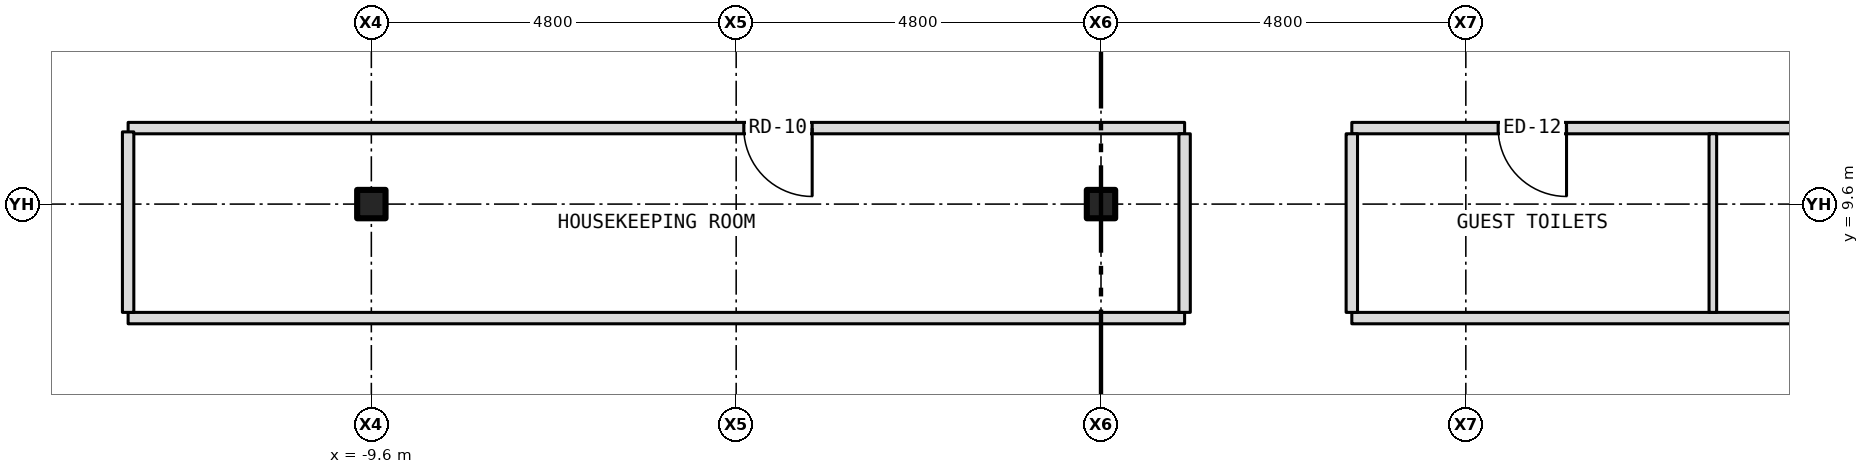
"""IFC4 building model, lengths in metres.
Left out: names, types, materials, properties, quantities, classifications, styles, units other than length and angle.
Written with IfcOpenShell. Run it as: python <this file> out.ifc"""

import sys

from ifc_helpers import new_model, si_unit, direction, frame, frame_2d, origin, origin_2d, place, context, subcontext, project, spatial, rectangle, i_section, extrude, element, fill, save


model = new_model("IFC4")
c1 = context("Model", 3, precision=1e-05, world=origin(), true_north=direction((0.0, 1.0)))
c2 = subcontext(c1, "Body", "Model", "MODEL_VIEW")
j1 = project(units=[si_unit("LENGTHUNIT", "METRE"), si_unit("PLANEANGLEUNIT", "RADIAN")], contexts=[c1])
p1 = place(None, origin())
s1 = spatial("IfcSite", under=j1, at=p1, CompositionType="ELEMENT")
p2 = place(p1, origin())
s2 = spatial("IfcBuilding", under=s1, at=p2, CompositionType="ELEMENT")
p3 = place(p2, frame((0.0, 0.0, 208.5)))
s3 = spatial("IfcBuildingStorey", under=s2, at=p3, CompositionType="ELEMENT", Elevation=208.5)
for number, where, z_axis, x_axis in (
    (1, (-9.6, 9.6, -0.15), (0.0, 0.0, 1.0), (1.0, 0.0, 0.0)),
    (2, (0.0, 9.6, -0.15), (0.0, 0.0, 1.0), (1.0, 0.0, 0.0)),
):
    element("IfcColumn", number, at=place(p3, frame(where, z_axis=z_axis, x_axis=x_axis)), inside=s3, PredefinedType="COLUMN", context=c2, shape_type="SweptSolid", body=[
        extrude(i_section(OverallWidth=0.373, OverallDepth=0.373, WebThickness=0.016, FlangeThickness=0.026, at=origin_2d()), origin(), (0.0, 0.0, 1.0), 3.5),
    ])
p4 = place(p3, frame((-12.8, 8.1, 0.0), z_axis=(0.0, 0.0, 1.0), x_axis=(1.0, 0.0, 0.0)))
e3 = element("IfcWall", 3, at=p4, inside=s3, PredefinedType="PARTITIONING", context=c2, shape_type="SweptSolid", body=[
    extrude(rectangle(XDim=13.9, YDim=0.15, at=frame_2d((6.95, 0.0))), origin(), (0.0, 0.0, 1.0), 3.35),
])
p5 = place(p3, frame((3.3, 8.1, 0.0), z_axis=(0.0, 0.0, 1.0), x_axis=(1.0, 0.0, 0.0)))
e4 = element("IfcWall", 4, at=p5, inside=s3, PredefinedType="PARTITIONING", context=c2, shape_type="SweptSolid", body=[
    extrude(rectangle(XDim=9.5, YDim=0.15, at=frame_2d((4.75, 0.0))), origin(), (0.0, 0.0, 1.0), 3.35),
])
p6 = place(p5, frame((6.675, 0.0, 0.0)))
e5 = element("IfcOpeningElement", 5, at=p6, cuts=e4, PredefinedType="OPENING", context=c2, shape_type="SweptSolid", body=[
    extrude(rectangle(XDim=0.9, YDim=2.1, at=frame_2d((0.45, 1.05))), frame((0.0, 0.087, 0.0), z_axis=(0.0, -1.0, 0.0), x_axis=(1.0, 0.0, 0.0)), (0.0, 0.0, 1.0), 0.174),
])
p7 = place(p3, frame((-12.8, 10.6, 0.0), z_axis=(0.0, 0.0, 1.0), x_axis=(1.0, 0.0, 0.0)))
e6 = element("IfcWall", 6, at=p7, inside=s3, PredefinedType="PARTITIONING", context=c2, shape_type="SweptSolid", body=[
    extrude(rectangle(XDim=13.9, YDim=0.15, at=frame_2d((6.95, 0.0))), origin(), (0.0, 0.0, 1.0), 3.35),
])
p8 = place(p7, frame((8.1, 0.0, 0.0)))
e7 = element("IfcOpeningElement", 7, at=p8, cuts=e6, PredefinedType="OPENING", context=c2, shape_type="SweptSolid", body=[
    extrude(rectangle(XDim=0.9, YDim=2.1, at=frame_2d((0.45, 1.05))), frame((0.0, 0.087, 0.0), z_axis=(0.0, -1.0, 0.0), x_axis=(1.0, 0.0, 0.0)), (0.0, 0.0, 1.0), 0.174),
])
p9 = place(p3, frame((3.3, 10.6, 0.0), z_axis=(0.0, 0.0, 1.0), x_axis=(1.0, 0.0, 0.0)))
e8 = element("IfcWall", 8, at=p9, inside=s3, PredefinedType="PARTITIONING", context=c2, shape_type="SweptSolid", body=[
    extrude(rectangle(XDim=9.5, YDim=0.15, at=frame_2d((4.75, 0.0))), origin(), (0.0, 0.0, 1.0), 3.35),
])
p10 = place(p9, frame((1.925, 0.0, 0.0)))
e9 = element("IfcOpeningElement", 9, at=p10, cuts=e8, PredefinedType="OPENING", context=c2, shape_type="SweptSolid", body=[
    extrude(rectangle(XDim=0.9, YDim=2.1, at=frame_2d((0.45, 1.05))), frame((0.0, 0.087, 0.0), z_axis=(0.0, -1.0, 0.0), x_axis=(1.0, 0.0, 0.0)), (0.0, 0.0, 1.0), 0.174),
])
p11 = place(p3, frame((-12.8, 8.175, 0.0), z_axis=(0.0, 0.0, 1.0), x_axis=(0.0, 1.0, 0.0)))
e10 = element("IfcWall", 10, at=p11, inside=s3, PredefinedType="PARTITIONING", context=c2, shape_type="SweptSolid", body=[
    extrude(rectangle(XDim=2.375, YDim=0.15, at=frame_2d((1.188, 0.0))), origin(), (0.0, 0.0, 1.0), 3.35),
])
for number, where, z_axis, x_axis in (
    (11, (1.1, 8.175, 0.0), (0.0, 0.0, 1.0), (0.0, 1.0, 0.0)),
    (12, (3.3, 8.175, 0.0), (0.0, 0.0, 1.0), (0.0, 1.0, 0.0)),
):
    element("IfcWall", number, at=place(p3, frame(where, z_axis=z_axis, x_axis=x_axis)), inside=s3, PredefinedType="PARTITIONING", context=c2, shape_type="SweptSolid", body=[
        extrude(rectangle(XDim=2.35, YDim=0.15, at=frame_2d((1.175, 0.0))), origin(), (0.0, 0.0, 1.0), 3.35),
    ])
p12 = place(p3, frame((8.05, 8.175, 0.0), z_axis=(0.0, 0.0, 1.0), x_axis=(0.0, 1.0, 0.0)))
e13 = element("IfcWall", 13, at=p12, inside=s3, PredefinedType="PARTITIONING", context=c2, shape_type="SweptSolid", body=[
    extrude(rectangle(XDim=2.35, YDim=0.1, at=frame_2d((1.175, 0.0))), origin(), (0.0, 0.0, 1.0), 3.35),
])
p13 = place(p10, origin())
e14 = element("IfcDoor", 14, at=p13, inside=s3, OperationType="SINGLE_SWING_RIGHT", PredefinedType="DOOR", context=c2, shape_type="SweptSolid", body=[
    extrude(rectangle(XDim=0.9, YDim=2.1, at=frame_2d((0.45, 1.05))), frame((0.0, 0.025, 0.0), z_axis=(0.0, -1.0, 0.0), x_axis=(1.0, 0.0, 0.0)), (0.0, 0.0, 1.0), 0.05),
])
fill(e9, e14)
p14 = place(p8, origin())
e15 = element("IfcDoor", 15, at=p14, inside=s3, OperationType="SINGLE_SWING_RIGHT", PredefinedType="DOOR", context=c2, shape_type="SweptSolid", body=[
    extrude(rectangle(XDim=0.9, YDim=2.1, at=frame_2d((0.45, 1.05))), frame((0.0, 0.025, 0.0), z_axis=(0.0, -1.0, 0.0), x_axis=(1.0, 0.0, 0.0)), (0.0, 0.0, 1.0), 0.05),
])
fill(e7, e15)
save(model, sys.argv[1])
